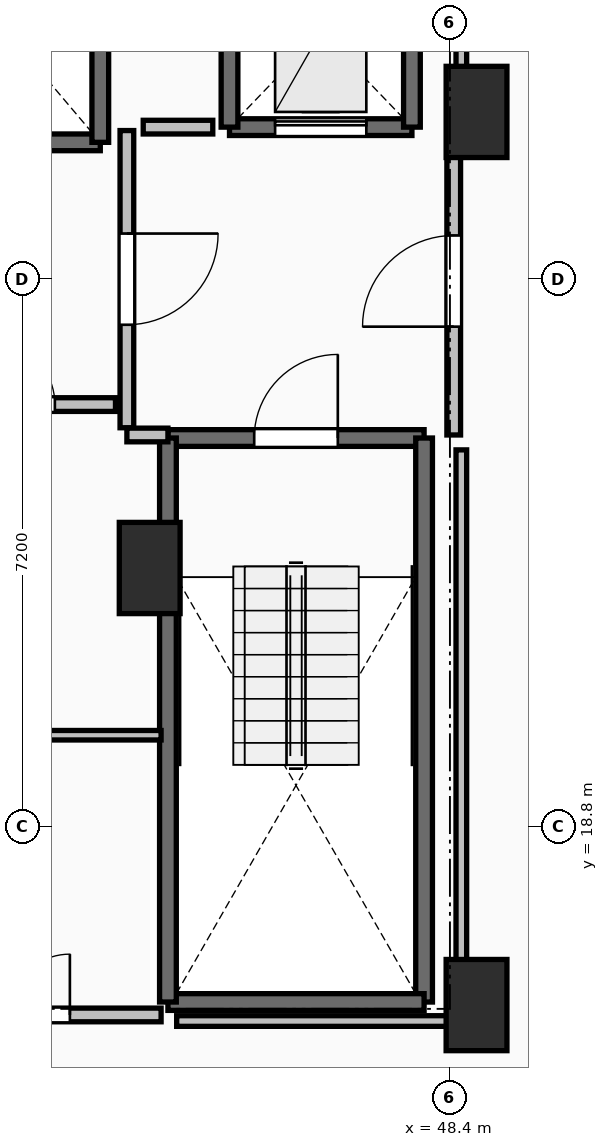
"""IFC4 building model, lengths in metres.
Left out: names, types, materials, properties, quantities, classifications, styles, units other than length and angle.
Written with IfcOpenShell. Run it as: python <this file> out.ifc"""

import sys

from ifc_helpers import new_model, si_unit, direction, frame, frame_2d, origin, origin_2d, place, context, subcontext, project, spatial, rectangle, extrude, element, fill, save


model = new_model("IFC4")
c1 = context("Model", 3, precision=1e-05, world=origin(), true_north=direction((0.0, 1.0)))
c2 = subcontext(c1, "Body", "Model", "MODEL_VIEW")
j1 = project(units=[si_unit("LENGTHUNIT", "METRE"), si_unit("PLANEANGLEUNIT", "RADIAN")], contexts=[c1])
p1 = place(None, origin())
s1 = spatial("IfcSite", under=j1, at=p1, CompositionType="ELEMENT")
p2 = place(p1, origin())
s2 = spatial("IfcBuilding", under=s1, at=p2, CompositionType="ELEMENT")
p3 = place(p2, frame((0.0, 0.0, 66.0)))
s3 = spatial("IfcBuildingStorey", under=s2, at=p3, CompositionType="ELEMENT", Elevation=66.0)
for number, where, z_axis, x_axis in (
    (1, (48.75, 28.2, 0.0), (0.0, 0.0, 1.0), (1.0, 0.0, 0.0)),
    (2, (48.75, 16.45, 0.0), (0.0, 0.0, 1.0), (1.0, 0.0, 0.0)),
    (3, (44.45, 22.2, 0.0), (0.0, 0.0, 1.0), (1.0, 0.0, 0.0)),
):
    element("IfcColumn", number, at=place(p3, frame(where, z_axis=z_axis, x_axis=x_axis)), inside=s3, PredefinedType="PILASTER", context=c2, shape_type="SweptSolid", body=[
        extrude(rectangle(XDim=0.8, YDim=1.2, at=origin_2d()), origin(), (0.0, 0.0, 1.0), 3.5),
    ])
p4 = place(p3, frame((44.69, 23.91, 0.0), z_axis=(0.0, 0.0, 1.0), x_axis=(1.0, 0.0, 0.0)))
e4 = element("IfcWall", 4, at=p4, inside=s3, PredefinedType="SOLIDWALL", context=c2, shape_type="SweptSolid", body=[
    extrude(rectangle(XDim=3.37, YDim=0.22, at=frame_2d((1.685, 0.0))), origin(), (0.0, 0.0, 1.0), 3.15),
])
p5 = place(p4, frame((1.135, 0.0, 0.0)))
e5 = element("IfcOpeningElement", 5, at=p5, cuts=e4, PredefinedType="OPENING", context=c2, shape_type="SweptSolid", body=[
    extrude(rectangle(XDim=1.1, YDim=2.15, at=frame_2d((0.55, 1.075))), frame((0.0, 0.125, 0.0), z_axis=(0.0, -1.0, 0.0), x_axis=(1.0, 0.0, 0.0)), (0.0, 0.0, 1.0), 0.25),
])
p6 = place(p3, frame((48.06, 23.91, 0.0), z_axis=(0.0, 0.0, 1.0), x_axis=(0.0, -1.0, 0.0)))
e6 = element("IfcWall", 6, at=p6, inside=s3, PredefinedType="SOLIDWALL", context=c2, shape_type="SweptSolid", body=[
    extrude(rectangle(XDim=7.42, YDim=0.22, at=frame_2d((3.71, 0.0))), origin(), (0.0, 0.0, 1.0), 3.15),
])
p7 = place(p3, frame((48.06, 16.49, 0.0), z_axis=(0.0, 0.0, 1.0), x_axis=(-1.0, 0.0, 0.0)))
e7 = element("IfcWall", 7, at=p7, inside=s3, PredefinedType="SOLIDWALL", context=c2, shape_type="SweptSolid", body=[
    extrude(rectangle(XDim=3.37, YDim=0.22, at=frame_2d((1.685, 0.0))), origin(), (0.0, 0.0, 1.0), 3.15),
])
p8 = place(p3, frame((44.69, 16.49, 0.0), z_axis=(0.0, 0.0, 1.0), x_axis=(0.0, 1.0, 0.0)))
e8 = element("IfcWall", 8, at=p8, inside=s3, PredefinedType="SOLIDWALL", context=c2, shape_type="SweptSolid", body=[
    extrude(rectangle(XDim=7.42, YDim=0.22, at=frame_2d((3.71, 0.0))), origin(), (0.0, 0.0, 1.0), 3.15),
])
p9 = place(p3, frame((41.6, 27.8, 0.0), z_axis=(0.0, 0.0, 1.0), x_axis=(1.0, 0.0, 0.0)))
e9 = element("IfcWall", 9, at=p9, inside=s3, PredefinedType="SOLIDWALL", context=c2, shape_type="SweptSolid", body=[
    extrude(rectangle(XDim=2.2, YDim=0.22, at=frame_2d((1.1, 0.0))), origin(), (0.0, 0.0, 1.0), 3.15),
])
p10 = place(p3, frame((43.8, 27.8, 0.0), z_axis=(0.0, 0.0, 1.0), x_axis=(0.0, 1.0, 0.0)))
e10 = element("IfcWall", 10, at=p10, inside=s3, PredefinedType="SOLIDWALL", context=c2, shape_type="SweptSolid", body=[
    extrude(rectangle(XDim=2.6, YDim=0.22, at=frame_2d((1.3, 0.0))), origin(), (0.0, 0.0, 1.0), 3.15),
])
p11 = place(p3, frame((45.5, 28.0, 0.0), z_axis=(0.0, 0.0, 1.0), x_axis=(1.0, 0.0, 0.0)))
e11 = element("IfcWall", 11, at=p11, inside=s3, PredefinedType="SHEAR", context=c2, shape_type="SweptSolid", body=[
    extrude(rectangle(XDim=2.4, YDim=0.22, at=frame_2d((1.2, 0.0))), origin(), (0.0, 0.0, 1.0), 3.15),
])
p12 = place(p11, frame((0.6, 0.0, 0.0)))
e12 = element("IfcOpeningElement", 12, at=p12, cuts=e11, PredefinedType="OPENING", context=c2, shape_type="SweptSolid", body=[
    extrude(rectangle(XDim=1.2, YDim=2.2, at=frame_2d((0.6, 1.1))), frame((0.0, 0.125, 0.0), z_axis=(0.0, -1.0, 0.0), x_axis=(1.0, 0.0, 0.0)), (0.0, 0.0, 1.0), 0.25),
])
for number, where, z_axis, x_axis in (
    (13, (47.9, 28.0, 0.0), (0.0, 0.0, 1.0), (0.0, 1.0, 0.0)),
    (14, (45.5, 30.5, 0.0), (0.0, 0.0, 1.0), (0.0, -1.0, 0.0)),
):
    element("IfcWall", number, at=place(p3, frame(where, z_axis=z_axis, x_axis=x_axis)), inside=s3, PredefinedType="SHEAR", context=c2, shape_type="SweptSolid", body=[
        extrude(rectangle(XDim=2.5, YDim=0.22, at=frame_2d((1.25, 0.0))), origin(), (0.0, 0.0, 1.0), 3.15),
    ])
p13 = place(p3, frame((44.15, 27.955, 0.0), z_axis=(0.0, 0.0, 1.0), x_axis=(0.0, -1.0, 0.0)))
e15 = element("IfcWall", 15, at=p13, inside=s3, PredefinedType="PARTITIONING", context=c2, shape_type="SweptSolid", body=[
    extrude(rectangle(XDim=3.91, YDim=0.18, at=frame_2d((1.955, 0.0))), origin(), (0.0, 0.0, 1.0), 3.15),
])
p14 = place(p13, frame((1.355, 0.0, 0.0)))
e16 = element("IfcOpeningElement", 16, at=p14, cuts=e15, PredefinedType="OPENING", context=c2, shape_type="SweptSolid", body=[
    extrude(rectangle(XDim=1.2, YDim=2.15, at=frame_2d((0.6, 1.075))), frame((0.0, 0.105, 0.0), z_axis=(0.0, -1.0, 0.0), x_axis=(1.0, 0.0, 0.0)), (0.0, 0.0, 1.0), 0.21),
])
p15 = place(p3, frame((44.15, 23.95, 0.0), z_axis=(0.0, 0.0, 1.0), x_axis=(1.0, 0.0, 0.0)))
e17 = element("IfcWall", 17, at=p15, inside=s3, PredefinedType="PARTITIONING", context=c2, shape_type="SweptSolid", body=[
    extrude(rectangle(XDim=0.54, YDim=0.18, at=frame_2d((0.27, 0.0))), origin(), (0.0, 0.0, 1.0), 3.15),
])
p16 = place(p3, frame((48.45, 23.95, 0.0), z_axis=(0.0, 0.0, 1.0), x_axis=(0.0, 1.0, 0.0)))
e18 = element("IfcWall", 18, at=p16, inside=s3, PredefinedType="PARTITIONING", context=c2, shape_type="SweptSolid", body=[
    extrude(rectangle(XDim=4.05, YDim=0.18, at=frame_2d((2.025, 0.0))), origin(), (0.0, 0.0, 1.0), 3.15),
])
p17 = place(p16, frame((1.425, 0.0, 0.0)))
e19 = element("IfcOpeningElement", 19, at=p17, cuts=e18, PredefinedType="OPENING", context=c2, shape_type="SweptSolid", body=[
    extrude(rectangle(XDim=1.2, YDim=2.15, at=frame_2d((0.6, 1.075))), frame((0.0, 0.105, 0.0), z_axis=(0.0, -1.0, 0.0), x_axis=(1.0, 0.0, 0.0)), (0.0, 0.0, 1.0), 0.21),
])
p18 = place(p3, frame((41.555, 24.35, 0.0), z_axis=(0.0, 0.0, 1.0), x_axis=(1.0, 0.0, 0.0)))
e20 = element("IfcWall", 20, at=p18, inside=s3, PredefinedType="PARTITIONING", context=c2, shape_type="SweptSolid", body=[
    extrude(rectangle(XDim=2.445, YDim=0.18, at=frame_2d((1.223, 0.0))), origin(), (0.0, 0.0, 1.0), 3.15),
])
p19 = place(p18, frame((0.798, 0.0, 0.0)))
e21 = element("IfcOpeningElement", 21, at=p19, cuts=e20, PredefinedType="OPENING", context=c2, shape_type="SweptSolid", body=[
    extrude(rectangle(XDim=0.85, YDim=2.1, at=frame_2d((0.425, 1.05))), frame((0.0, 0.105, 0.0), z_axis=(0.0, -1.0, 0.0), x_axis=(1.0, 0.0, 0.0)), (0.0, 0.0, 1.0), 0.21),
])
p20 = place(p3, frame((44.6, 20.0, 0.0), z_axis=(0.0, 0.0, 1.0), x_axis=(-1.0, 0.0, 0.0)))
e22 = element("IfcWall", 22, at=p20, inside=s3, PredefinedType="PARTITIONING", context=c2, shape_type="SweptSolid", body=[
    extrude(rectangle(XDim=3.2, YDim=0.125, at=frame_2d((1.6, 0.0))), origin(), (0.0, 0.0, 1.0), 3.15),
])
p21 = place(p3, frame((41.4, 16.32, 0.0), z_axis=(0.0, 0.0, 1.0), x_axis=(1.0, 0.0, 0.0)))
e23 = element("IfcWall", 23, at=p21, inside=s3, PredefinedType="PARTITIONING", context=c2, shape_type="SweptSolid", body=[
    extrude(rectangle(XDim=3.2, YDim=0.18, at=frame_2d((1.6, 0.0))), origin(), (0.0, 0.0, 1.0), 3.15),
])
p22 = place(p21, frame((1.2, 0.0, 0.0)))
e24 = element("IfcOpeningElement", 24, at=p22, cuts=e23, PredefinedType="OPENING", context=c2, shape_type="SweptSolid", body=[
    extrude(rectangle(XDim=0.8, YDim=2.05, at=frame_2d((0.4, 1.025))), frame((0.0, 0.105, 0.0), z_axis=(0.0, -1.0, 0.0), x_axis=(1.0, 0.0, 0.0)), (0.0, 0.0, 1.0), 0.21),
])
p23 = place(p3, frame((45.28, 28.0, 0.0), z_axis=(0.0, 0.0, 1.0), x_axis=(-1.0, 0.0, 0.0)))
e25 = element("IfcWall", 25, at=p23, inside=s3, PredefinedType="PARTITIONING", context=c2, shape_type="SweptSolid", body=[
    extrude(rectangle(XDim=0.915, YDim=0.18, at=frame_2d((0.458, 0.0))), origin(), (0.0, 0.0, 1.0), 3.15),
])
p24 = place(p3, frame((48.55, 33.45, 0.0), z_axis=(0.0, 0.0, 1.0), x_axis=(0.0, -1.0, 0.0)))
e26 = element("IfcWall", 26, at=p24, inside=s3, PredefinedType="PARTITIONING", context=c2, shape_type="SweptSolid", body=[
    extrude(rectangle(XDim=5.254, YDim=0.14, at=frame_2d((2.627, 0.0))), origin(), (0.0, 0.0, 1.0), 2.342),
])
p25 = place(p3, frame((48.55, 23.754, 0.0), z_axis=(0.0, 0.0, 1.0), x_axis=(0.0, -1.0, 0.0)))
e27 = element("IfcWall", 27, at=p25, inside=s3, PredefinedType="PARTITIONING", context=c2, shape_type="SweptSolid", body=[
    extrude(rectangle(XDim=7.514, YDim=0.14, at=frame_2d((3.757, 0.0))), origin(), (0.0, 0.0, 1.0), 2.342),
])
p26 = place(p3, frame((48.55, 16.24, 0.0), z_axis=(0.0, 0.0, 1.0), x_axis=(-1.0, 0.0, 0.0)))
e28 = element("IfcWall", 28, at=p26, inside=s3, PredefinedType="PARTITIONING", context=c2, shape_type="SweptSolid", body=[
    extrude(rectangle(XDim=3.745, YDim=0.14, at=frame_2d((1.873, 0.0))), origin(), (0.0, 0.0, 1.0), 2.342),
])
p27 = place(p5, origin())
e29 = element("IfcDoor", 29, at=p27, inside=s3, OperationType="SINGLE_SWING_RIGHT", PredefinedType="DOOR", context=c2, shape_type="SweptSolid", body=[
    extrude(rectangle(XDim=1.1, YDim=2.15, at=frame_2d((0.55, 1.075))), frame((0.0, 0.025, 0.0), z_axis=(0.0, -1.0, 0.0), x_axis=(1.0, 0.0, 0.0)), (0.0, 0.0, 1.0), 0.05),
])
fill(e5, e29)
p28 = place(p12, origin())
e30 = element("IfcDoor", 30, at=p28, inside=s3, OperationType="SLIDING_TO_LEFT", PredefinedType="DOOR", context=c2, shape_type="SweptSolid", body=[
    extrude(rectangle(XDim=1.2, YDim=2.2, at=frame_2d((0.6, 1.1))), frame((0.0, 0.025, 0.0), z_axis=(0.0, -1.0, 0.0), x_axis=(1.0, 0.0, 0.0)), (0.0, 0.0, 1.0), 0.05),
])
fill(e12, e30)
p29 = place(p14, origin())
e31 = element("IfcDoor", 31, at=p29, inside=s3, OperationType="SINGLE_SWING_LEFT", PredefinedType="DOOR", context=c2, shape_type="SweptSolid", body=[
    extrude(rectangle(XDim=1.2, YDim=2.15, at=frame_2d((0.6, 1.075))), frame((0.0, 0.025, 0.0), z_axis=(0.0, -1.0, 0.0), x_axis=(1.0, 0.0, 0.0)), (0.0, 0.0, 1.0), 0.05),
])
fill(e16, e31)
p30 = place(p17, origin())
e32 = element("IfcDoor", 32, at=p30, inside=s3, OperationType="SINGLE_SWING_LEFT", PredefinedType="DOOR", context=c2, shape_type="SweptSolid", body=[
    extrude(rectangle(XDim=1.2, YDim=2.15, at=frame_2d((0.6, 1.075))), frame((0.0, 0.025, 0.0), z_axis=(0.0, -1.0, 0.0), x_axis=(1.0, 0.0, 0.0)), (0.0, 0.0, 1.0), 0.05),
])
fill(e19, e32)
p31 = place(p19, origin())
e33 = element("IfcDoor", 33, at=p31, inside=s3, OperationType="SINGLE_SWING_LEFT", PredefinedType="DOOR", context=c2, shape_type="SweptSolid", body=[
    extrude(rectangle(XDim=0.85, YDim=2.1, at=frame_2d((0.425, 1.05))), frame((0.0, 0.025, 0.0), z_axis=(0.0, -1.0, 0.0), x_axis=(1.0, 0.0, 0.0)), (0.0, 0.0, 1.0), 0.05),
])
fill(e21, e33)
p32 = place(p22, origin())
e34 = element("IfcDoor", 34, at=p32, inside=s3, OperationType="SINGLE_SWING_RIGHT", PredefinedType="DOOR", context=c2, shape_type="SweptSolid", body=[
    extrude(rectangle(XDim=0.8, YDim=2.05, at=frame_2d((0.4, 1.025))), frame((0.0, 0.025, 0.0), z_axis=(0.0, -1.0, 0.0), x_axis=(1.0, 0.0, 0.0)), (0.0, 0.0, 1.0), 0.05),
])
fill(e24, e34)
save(model, sys.argv[1])
